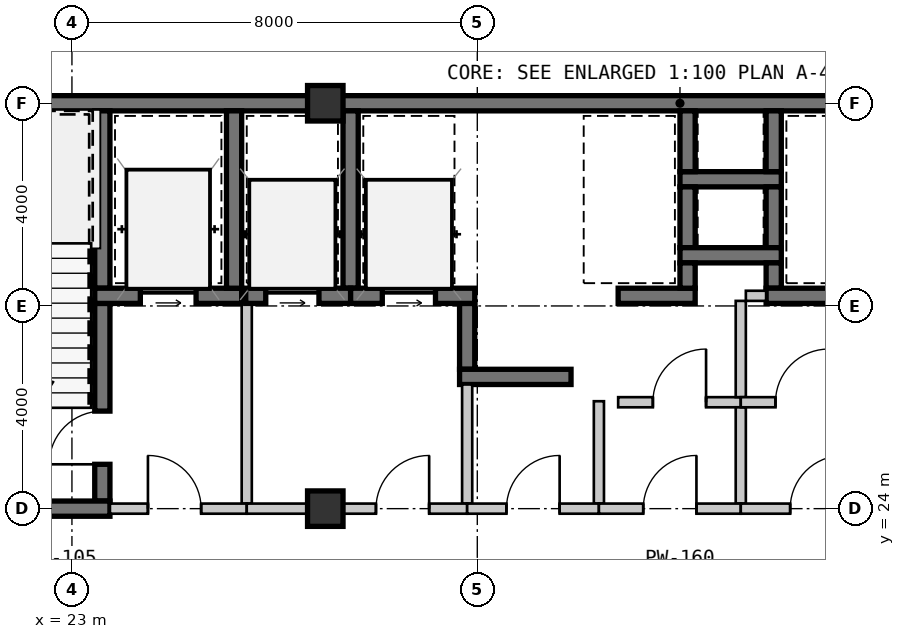
"""IFC4 building model, lengths in metres.
Left out: names, types, materials, properties, quantities, classifications, styles, units other than length and angle.
Written with IfcOpenShell. Run it as: python <this file> out.ifc"""

import sys

from ifc_helpers import new_model, si_unit, direction, frame, frame_2d, origin, origin_2d, place, context, subcontext, project, spatial, rectangle, extrude, source, transform, mapped, element, fill, save


model = new_model("IFC4")
c1 = context("Model", 3, precision=1e-05, world=origin(), true_north=direction((0.0, 1.0)))
c2 = subcontext(c1, "Body", "Model", "MODEL_VIEW")
j1 = project(units=[si_unit("LENGTHUNIT", "METRE"), si_unit("PLANEANGLEUNIT", "RADIAN")], contexts=[c1])
p1 = place(None, origin())
s1 = spatial("IfcSite", under=j1, at=p1, CompositionType="ELEMENT")
p2 = place(p1, origin())
s2 = spatial("IfcBuilding", under=s1, at=p2, CompositionType="ELEMENT")
p3 = place(p2, frame((0.0, 0.0, 99.75)))
s3 = spatial("IfcBuildingStorey", under=s2, at=p3, CompositionType="ELEMENT", Elevation=99.75)
m1 = source(origin(), c2, "Body", "SweptSolid", [
    extrude(rectangle(XDim=0.7, YDim=0.7, at=origin_2d()), origin(), (0.0, 0.0, 1.0), 3.15),
])
for number, where, z_axis, x_axis in (
    (1, (28.0, 24.0, 0.0), (0.0, 0.0, 1.0), (1.0, 0.0, 0.0)),
    (2, (28.0, 32.0, 0.0), (0.0, 0.0, 1.0), (1.0, 0.0, 0.0)),
):
    element("IfcColumn", number, at=place(p3, frame(where, z_axis=z_axis, x_axis=x_axis)), inside=s3, PredefinedType="COLUMN", context=c2, shape_type="MappedRepresentation", body=[
        mapped(m1, transform((0.0, 0.0, 0.0), scale=1.0)),
    ])
m2 = source(origin(), c2, "Body", "SweptSolid", [
    extrude(rectangle(XDim=9.15, YDim=0.3, at=frame_2d((4.575, 0.0))), origin(), (0.0, 0.0, 1.0), 2.93),
])
p4 = place(p3, frame((18.85, 32.0, 0.0), z_axis=(0.0, 0.0, 1.0), x_axis=(1.0, 0.0, 0.0)))
e3 = element("IfcWall", 3, at=p4, inside=s3, PredefinedType="SHEAR", context=c2, shape_type="MappedRepresentation", body=[
    mapped(m2, transform((0.0, 0.0, 0.0), scale=1.0)),
])
m3 = source(origin(), c2, "Body", "SweptSolid", [
    extrude(rectangle(XDim=11.2, YDim=0.3, at=frame_2d((5.6, 0.0))), origin(), (0.0, 0.0, 1.0), 2.93),
])
p5 = place(p3, frame((28.0, 32.0, 0.0), z_axis=(0.0, 0.0, 1.0), x_axis=(1.0, 0.0, 0.0)))
e4 = element("IfcWall", 4, at=p5, inside=s3, PredefinedType="SHEAR", context=c2, shape_type="MappedRepresentation", body=[
    mapped(m3, transform((0.0, 0.0, 0.0), scale=1.0)),
])
m4 = source(origin(), c2, "Body", "SweptSolid", [
    extrude(rectangle(XDim=3.5, YDim=0.3, at=frame_2d((1.75, 0.0))), origin(), (0.0, 0.0, 1.0), 2.93),
])
p6 = place(p3, frame((23.6, 28.35, 0.0), z_axis=(0.0, 0.0, 1.0), x_axis=(0.0, 1.0, 0.0)))
e5 = element("IfcWall", 5, at=p6, inside=s3, PredefinedType="SHEAR", context=c2, shape_type="MappedRepresentation", body=[
    mapped(m4, transform((0.0, 0.0, 0.0), scale=1.0)),
])
m5 = source(origin(), c2, "Body", "SweptSolid", [
    extrude(rectangle(XDim=3.9, YDim=0.3, at=frame_2d((1.95, 0.0))), origin(), (0.0, 0.0, 1.0), 2.93),
])
p7 = place(p3, frame((23.6, 24.15, 0.0), z_axis=(0.0, 0.0, 1.0), x_axis=(0.0, 1.0, 0.0)))
e6 = element("IfcWall", 6, at=p7, inside=s3, PredefinedType="SHEAR", context=c2, shape_type="MappedRepresentation", body=[
    mapped(m5, transform((0.0, 0.0, 0.0), scale=1.0)),
])
m6 = source(origin(), c2, "Body", "SweptSolid", [
    extrude(rectangle(XDim=1.05, YDim=2.1, at=frame_2d((0.525, 1.05))), frame((0.0, 0.16, 0.0), z_axis=(0.0, -1.0, 0.0), x_axis=(1.0, 0.0, 0.0)), (0.0, 0.0, 1.0), 0.32),
])
p8 = place(p7, frame((0.725, 0.0, 0.0)))
e7 = element("IfcOpeningElement", 7, at=p8, cuts=e6, PredefinedType="OPENING", context=c2, shape_type="MappedRepresentation", body=[
    mapped(m6, transform((0.0, 0.0, 0.0), scale=1.0)),
])
m7 = source(origin(), c2, "Body", "SweptSolid", [
    extrude(rectangle(XDim=4.9, YDim=0.3, at=frame_2d((2.45, 0.0))), origin(), (0.0, 0.0, 1.0), 2.93),
])
p9 = place(p3, frame((18.85, 24.0, 0.0), z_axis=(0.0, 0.0, 1.0), x_axis=(1.0, 0.0, 0.0)))
e8 = element("IfcWall", 8, at=p9, inside=s3, PredefinedType="SHEAR", context=c2, shape_type="MappedRepresentation", body=[
    mapped(m7, transform((0.0, 0.0, 0.0), scale=1.0)),
])
m8 = source(origin(), c2, "Body", "SweptSolid", [
    extrude(rectangle(XDim=2.9, YDim=0.3, at=frame_2d((1.45, 0.0))), origin(), (0.0, 0.0, 1.0), 2.93),
])
p10 = place(p3, frame((23.45, 28.2, 0.0), z_axis=(0.0, 0.0, 1.0), x_axis=(1.0, 0.0, 0.0)))
e9 = element("IfcWall", 9, at=p10, inside=s3, PredefinedType="SHEAR", context=c2, shape_type="MappedRepresentation", body=[
    mapped(m8, transform((0.0, 0.0, 0.0), scale=1.0)),
])
m9 = source(origin(), c2, "Body", "SweptSolid", [
    extrude(rectangle(XDim=1.1, YDim=2.15, at=frame_2d((0.55, 1.075))), frame((0.0, 0.16, 0.0), z_axis=(0.0, -1.0, 0.0), x_axis=(1.0, 0.0, 0.0)), (0.0, 0.0, 1.0), 0.32),
])
p11 = place(p10, frame((0.9, 0.0, 0.0)))
e10 = element("IfcOpeningElement", 10, at=p11, cuts=e9, PredefinedType="OPENING", context=c2, shape_type="MappedRepresentation", body=[
    mapped(m9, transform((0.0, 0.0, 0.0), scale=1.0)),
])
p12 = place(p3, frame((26.2, 28.35, 0.0), z_axis=(0.0, 0.0, 1.0), x_axis=(0.0, 1.0, 0.0)))
e11 = element("IfcWall", 11, at=p12, inside=s3, PredefinedType="SHEAR", context=c2, shape_type="MappedRepresentation", body=[
    mapped(m4, transform((0.0, 0.0, 0.0), scale=1.0)),
])
m10 = source(origin(), c2, "Body", "SweptSolid", [
    extrude(rectangle(XDim=3.95, YDim=0.2, at=frame_2d((1.975, 0.0))), origin(), (0.0, 0.0, 1.0), 2.93),
])
p13 = place(p3, frame((26.45, 24.1, 0.0), z_axis=(0.0, 0.0, 1.0), x_axis=(0.0, 1.0, 0.0)))
e12 = element("IfcWall", 12, at=p13, inside=s3, PredefinedType="SOLIDWALL", context=c2, shape_type="MappedRepresentation", body=[
    mapped(m10, transform((0.0, 0.0, 0.0), scale=1.0)),
])
m11 = source(origin(), c2, "Body", "SweptSolid", [
    extrude(rectangle(XDim=2.7, YDim=0.2, at=frame_2d((1.35, 0.0))), origin(), (0.0, 0.0, 1.0), 2.47),
])
p14 = place(p3, frame((23.75, 24.0, 0.0), z_axis=(0.0, 0.0, 1.0), x_axis=(1.0, 0.0, 0.0)))
e13 = element("IfcWall", 13, at=p14, inside=s3, PredefinedType="SOLIDWALL", context=c2, shape_type="MappedRepresentation", body=[
    mapped(m11, transform((0.0, 0.0, 0.0), scale=1.0)),
])
m12 = source(origin(), c2, "Body", "SweptSolid", [
    extrude(rectangle(XDim=1.05, YDim=2.1, at=frame_2d((0.525, 1.05))), frame((0.0, 0.11, 0.0), z_axis=(0.0, -1.0, 0.0), x_axis=(1.0, 0.0, 0.0)), (0.0, 0.0, 1.0), 0.22),
])
p15 = place(p14, frame((0.75, 0.0, 0.0)))
e14 = element("IfcOpeningElement", 14, at=p15, cuts=e13, PredefinedType="OPENING", context=c2, shape_type="MappedRepresentation", body=[
    mapped(m12, transform((0.0, 0.0, 0.0), scale=1.0)),
])
m13 = source(origin(), c2, "Body", "SweptSolid", [
    extrude(rectangle(XDim=2.0, YDim=0.3, at=frame_2d((1.0, 0.0))), origin(), (0.0, 0.0, 1.0), 2.93),
])
p16 = place(p3, frame((35.0, 30.5, 0.0), z_axis=(0.0, 0.0, 1.0), x_axis=(1.0, 0.0, 0.0)))
e15 = element("IfcWall", 15, at=p16, inside=s3, PredefinedType="SHEAR", context=c2, shape_type="MappedRepresentation", body=[
    mapped(m13, transform((0.0, 0.0, 0.0), scale=1.0)),
])
m14 = source(origin(), c2, "Body", "SweptSolid", [
    extrude(rectangle(XDim=1.2, YDim=0.3, at=frame_2d((0.6, 0.0))), origin(), (0.0, 0.0, 1.0), 2.93),
])
for number, where, z_axis, x_axis in (
    (16, (35.15, 31.85, 0.0), (0.0, 0.0, 1.0), (0.0, -1.0, 0.0)),
    (17, (36.85, 30.65, 0.0), (0.0, 0.0, 1.0), (0.0, 1.0, 0.0)),
    (18, (35.15, 30.35, 0.0), (0.0, 0.0, 1.0), (0.0, -1.0, 0.0)),
    (19, (36.85, 29.15, 0.0), (0.0, 0.0, 1.0), (0.0, 1.0, 0.0)),
):
    element("IfcWall", number, at=place(p3, frame(where, z_axis=z_axis, x_axis=x_axis)), inside=s3, PredefinedType="SHEAR", context=c2, shape_type="MappedRepresentation", body=[
        mapped(m14, transform((0.0, 0.0, 0.0), scale=1.0)),
    ])
p17 = place(p3, frame((35.0, 29.0, 0.0), z_axis=(0.0, 0.0, 1.0), x_axis=(1.0, 0.0, 0.0)))
e20 = element("IfcWall", 20, at=p17, inside=s3, PredefinedType="SHEAR", context=c2, shape_type="MappedRepresentation", body=[
    mapped(m13, transform((0.0, 0.0, 0.0), scale=1.0)),
])
m15 = source(origin(), c2, "Body", "SweptSolid", [
    extrude(rectangle(XDim=1.3, YDim=0.3, at=frame_2d((0.65, 0.0))), origin(), (0.0, 0.0, 1.0), 2.93),
])
p18 = place(p3, frame((30.8, 28.05, 0.0), z_axis=(0.0, 0.0, 1.0), x_axis=(0.0, -1.0, 0.0)))
e21 = element("IfcWall", 21, at=p18, inside=s3, PredefinedType="SHEAR", context=c2, shape_type="MappedRepresentation", body=[
    mapped(m15, transform((0.0, 0.0, 0.0), scale=1.0)),
])
m16 = source(origin(), c2, "Body", "SweptSolid", [
    extrude(rectangle(XDim=2.2, YDim=0.3, at=frame_2d((1.1, 0.0))), origin(), (0.0, 0.0, 1.0), 2.93),
])
p19 = place(p3, frame((30.65, 26.6, 0.0), z_axis=(0.0, 0.0, 1.0), x_axis=(1.0, 0.0, 0.0)))
e22 = element("IfcWall", 22, at=p19, inside=s3, PredefinedType="SHEAR", context=c2, shape_type="MappedRepresentation", body=[
    mapped(m16, transform((0.0, 0.0, 0.0), scale=1.0)),
])
p20 = place(p3, frame((28.5, 28.35, 0.0), z_axis=(0.0, 0.0, 1.0), x_axis=(0.0, 1.0, 0.0)))
e23 = element("IfcWall", 23, at=p20, inside=s3, PredefinedType="SHEAR", context=c2, shape_type="MappedRepresentation", body=[
    mapped(m4, transform((0.0, 0.0, 0.0), scale=1.0)),
])
m17 = source(origin(), c2, "Body", "SweptSolid", [
    extrude(rectangle(XDim=2.07, YDim=0.3, at=frame_2d((1.035, 0.0))), origin(), (0.0, 0.0, 1.0), 2.93),
])
p21 = place(p3, frame((26.43, 28.2, 0.0), z_axis=(0.0, 0.0, 1.0), x_axis=(1.0, 0.0, 0.0)))
e24 = element("IfcWall", 24, at=p21, inside=s3, PredefinedType="SHEAR", context=c2, shape_type="MappedRepresentation", body=[
    mapped(m17, transform((0.0, 0.0, 0.0), scale=1.0)),
])
m18 = source(origin(), c2, "Body", "SweptSolid", [
    extrude(rectangle(XDim=1.05, YDim=2.15, at=frame_2d((0.525, 1.075))), frame((0.0, 0.16, 0.0), z_axis=(0.0, -1.0, 0.0), x_axis=(1.0, 0.0, 0.0)), (0.0, 0.0, 1.0), 0.32),
])
p22 = place(p21, frame((0.395, 0.0, 0.0)))
e25 = element("IfcOpeningElement", 25, at=p22, cuts=e24, PredefinedType="OPENING", context=c2, shape_type="MappedRepresentation", body=[
    mapped(m18, transform((0.0, 0.0, 0.0), scale=1.0)),
])
m19 = source(origin(), c2, "Body", "SweptSolid", [
    extrude(rectangle(XDim=2.45, YDim=0.3, at=frame_2d((1.225, 0.0))), origin(), (0.0, 0.0, 1.0), 2.93),
])
p23 = place(p3, frame((28.5, 28.2, 0.0), z_axis=(0.0, 0.0, 1.0), x_axis=(1.0, 0.0, 0.0)))
e26 = element("IfcWall", 26, at=p23, inside=s3, PredefinedType="SHEAR", context=c2, shape_type="MappedRepresentation", body=[
    mapped(m19, transform((0.0, 0.0, 0.0), scale=1.0)),
])
p24 = place(p23, frame((0.625, 0.0, 0.0)))
e27 = element("IfcOpeningElement", 27, at=p24, cuts=e26, PredefinedType="OPENING", context=c2, shape_type="MappedRepresentation", body=[
    mapped(m18, transform((0.0, 0.0, 0.0), scale=1.0)),
])
m20 = source(origin(), c2, "Body", "SweptSolid", [
    extrude(rectangle(XDim=2.35, YDim=0.2, at=frame_2d((1.175, 0.0))), origin(), (0.0, 0.0, 1.0), 2.93),
])
p25 = place(p3, frame((30.8, 26.45, 0.0), z_axis=(0.0, 0.0, 1.0), x_axis=(0.0, -1.0, 0.0)))
e28 = element("IfcWall", 28, at=p25, inside=s3, PredefinedType="SOLIDWALL", context=c2, shape_type="MappedRepresentation", body=[
    mapped(m20, transform((0.0, 0.0, 0.0), scale=1.0)),
])
m21 = source(origin(), c2, "Body", "SweptSolid", [
    extrude(rectangle(XDim=4.35, YDim=0.2, at=frame_2d((2.175, 0.0))), origin(), (0.0, 0.0, 1.0), 2.47),
])
p26 = place(p3, frame((30.8, 24.0, 0.0), z_axis=(0.0, 0.0, 1.0), x_axis=(-1.0, 0.0, 0.0)))
e29 = element("IfcWall", 29, at=p26, inside=s3, PredefinedType="SOLIDWALL", context=c2, shape_type="MappedRepresentation", body=[
    mapped(m21, transform((0.0, 0.0, 0.0), scale=1.0)),
])
p27 = place(p26, frame((0.75, 0.0, 0.0)))
e30 = element("IfcOpeningElement", 30, at=p27, cuts=e29, PredefinedType="OPENING", context=c2, shape_type="MappedRepresentation", body=[
    mapped(m12, transform((0.0, 0.0, 0.0), scale=1.0)),
])
m22 = source(origin(), c2, "Body", "SweptSolid", [
    extrude(rectangle(XDim=1.52, YDim=0.3, at=frame_2d((0.76, 0.0))), origin(), (0.0, 0.0, 1.0), 2.93),
])
p28 = place(p3, frame((33.78, 28.2, 0.0), z_axis=(0.0, 0.0, 1.0), x_axis=(1.0, 0.0, 0.0)))
e31 = element("IfcWall", 31, at=p28, inside=s3, PredefinedType="SHEAR", context=c2, shape_type="MappedRepresentation", body=[
    mapped(m22, transform((0.0, 0.0, 0.0), scale=1.0)),
])
m23 = source(origin(), c2, "Body", "SweptSolid", [
    extrude(rectangle(XDim=0.5, YDim=0.3, at=frame_2d((0.25, 0.0))), origin(), (0.0, 0.0, 1.0), 2.93),
])
for number, where, z_axis, x_axis in (
    (32, (35.15, 28.35, 0.0), (0.0, 0.0, 1.0), (0.0, 1.0, 0.0)),
    (33, (36.85, 28.85, 0.0), (0.0, 0.0, 1.0), (0.0, -1.0, 0.0)),
):
    element("IfcWall", number, at=place(p3, frame(where, z_axis=z_axis, x_axis=x_axis)), inside=s3, PredefinedType="SHEAR", context=c2, shape_type="MappedRepresentation", body=[
        mapped(m23, transform((0.0, 0.0, 0.0), scale=1.0)),
    ])
m24 = source(origin(), c2, "Body", "SweptSolid", [
    extrude(rectangle(XDim=1.92, YDim=0.3, at=frame_2d((0.96, 0.0))), origin(), (0.0, 0.0, 1.0), 2.93),
])
p29 = place(p3, frame((36.7, 28.2, 0.0), z_axis=(0.0, 0.0, 1.0), x_axis=(1.0, 0.0, 0.0)))
e34 = element("IfcWall", 34, at=p29, inside=s3, PredefinedType="SHEAR", context=c2, shape_type="MappedRepresentation", body=[
    mapped(m24, transform((0.0, 0.0, 0.0), scale=1.0)),
])
m25 = source(origin(), c2, "Body", "SweptSolid", [
    extrude(rectangle(XDim=2.02, YDim=0.2, at=frame_2d((1.01, 0.0))), origin(), (0.0, 0.0, 1.0), 2.93),
])
p30 = place(p3, frame((33.4, 26.12, 0.0), z_axis=(0.0, 0.0, 1.0), x_axis=(0.0, -1.0, 0.0)))
e35 = element("IfcWall", 35, at=p30, inside=s3, PredefinedType="SOLIDWALL", context=c2, shape_type="MappedRepresentation", body=[
    mapped(m25, transform((0.0, 0.0, 0.0), scale=1.0)),
])
m26 = source(origin(), c2, "Body", "SweptSolid", [
    extrude(rectangle(XDim=2.6, YDim=0.2, at=frame_2d((1.3, 0.0))), origin(), (0.0, 0.0, 1.0), 2.47),
])
p31 = place(p3, frame((33.4, 24.0, 0.0), z_axis=(0.0, 0.0, 1.0), x_axis=(-1.0, 0.0, 0.0)))
e36 = element("IfcWall", 36, at=p31, inside=s3, PredefinedType="SOLIDWALL", context=c2, shape_type="MappedRepresentation", body=[
    mapped(m26, transform((0.0, 0.0, 0.0), scale=1.0)),
])
p32 = place(p31, frame((0.775, 0.0, 0.0)))
e37 = element("IfcOpeningElement", 37, at=p32, cuts=e36, PredefinedType="OPENING", context=c2, shape_type="MappedRepresentation", body=[
    mapped(m12, transform((0.0, 0.0, 0.0), scale=1.0)),
])
m27 = source(origin(), c2, "Body", "SweptSolid", [
    extrude(rectangle(XDim=2.42, YDim=0.2, at=frame_2d((1.21, 0.0))), origin(), (0.0, 0.0, 1.0), 2.93),
])
p33 = place(p3, frame((33.78, 26.1, 0.0), z_axis=(0.0, 0.0, 1.0), x_axis=(1.0, 0.0, 0.0)))
e38 = element("IfcWall", 38, at=p33, inside=s3, PredefinedType="SOLIDWALL", context=c2, shape_type="MappedRepresentation", body=[
    mapped(m27, transform((0.0, 0.0, 0.0), scale=1.0)),
])
p34 = place(p33, frame((0.685, 0.0, 0.0)))
e39 = element("IfcOpeningElement", 39, at=p34, cuts=e38, PredefinedType="OPENING", context=c2, shape_type="MappedRepresentation", body=[
    mapped(m12, transform((0.0, 0.0, 0.0), scale=1.0)),
])
m28 = source(origin(), c2, "Body", "SweptSolid", [
    extrude(rectangle(XDim=1.9, YDim=0.2, at=frame_2d((0.95, 0.0))), origin(), (0.0, 0.0, 1.0), 2.93),
])
p35 = place(p3, frame((36.2, 26.0, 0.0), z_axis=(0.0, 0.0, 1.0), x_axis=(0.0, -1.0, 0.0)))
e40 = element("IfcWall", 40, at=p35, inside=s3, PredefinedType="SOLIDWALL", context=c2, shape_type="MappedRepresentation", body=[
    mapped(m28, transform((0.0, 0.0, 0.0), scale=1.0)),
])
m29 = source(origin(), c2, "Body", "SweptSolid", [
    extrude(rectangle(XDim=2.8, YDim=0.2, at=frame_2d((1.4, 0.0))), origin(), (0.0, 0.0, 1.0), 2.47),
])
p36 = place(p3, frame((36.2, 24.0, 0.0), z_axis=(0.0, 0.0, 1.0), x_axis=(-1.0, 0.0, 0.0)))
e41 = element("IfcWall", 41, at=p36, inside=s3, PredefinedType="SOLIDWALL", context=c2, shape_type="MappedRepresentation", body=[
    mapped(m29, transform((0.0, 0.0, 0.0), scale=1.0)),
])
p37 = place(p36, frame((0.875, 0.0, 0.0)))
e42 = element("IfcOpeningElement", 42, at=p37, cuts=e41, PredefinedType="OPENING", context=c2, shape_type="MappedRepresentation", body=[
    mapped(m12, transform((0.0, 0.0, 0.0), scale=1.0)),
])
m30 = source(origin(), c2, "Body", "SweptSolid", [
    extrude(rectangle(XDim=1.9, YDim=0.2, at=frame_2d((0.95, 0.0))), origin(), (0.0, 0.0, 1.0), 2.93),
])
p38 = place(p3, frame((36.2, 28.1, 0.0), z_axis=(0.0, 0.0, 1.0), x_axis=(0.0, -1.0, 0.0)))
e43 = element("IfcWall", 43, at=p38, inside=s3, PredefinedType="SOLIDWALL", context=c2, shape_type="MappedRepresentation", body=[
    mapped(m30, transform((0.0, 0.0, 0.0), scale=1.0)),
])
m31 = source(origin(), c2, "Body", "SweptSolid", [
    extrude(rectangle(XDim=0.4, YDim=0.2, at=frame_2d((0.2, 0.0))), origin(), (0.0, 0.0, 1.0), 2.93),
])
p39 = place(p3, frame((36.7, 28.2, 0.0), z_axis=(0.0, 0.0, 1.0), x_axis=(-1.0, 0.0, 0.0)))
e44 = element("IfcWall", 44, at=p39, inside=s3, PredefinedType="SOLIDWALL", context=c2, shape_type="MappedRepresentation", body=[
    mapped(m31, transform((0.0, 0.0, 0.0), scale=1.0)),
])
m32 = source(origin(), c2, "Body", "SweptSolid", [
    extrude(rectangle(XDim=2.42, YDim=0.2, at=frame_2d((1.21, 0.0))), origin(), (0.0, 0.0, 1.0), 2.93),
])
p40 = place(p3, frame((36.2, 26.1, 0.0), z_axis=(0.0, 0.0, 1.0), x_axis=(1.0, 0.0, 0.0)))
e45 = element("IfcWall", 45, at=p40, inside=s3, PredefinedType="SOLIDWALL", context=c2, shape_type="MappedRepresentation", body=[
    mapped(m32, transform((0.0, 0.0, 0.0), scale=1.0)),
])
p41 = place(p40, frame((0.685, 0.0, 0.0)))
e46 = element("IfcOpeningElement", 46, at=p41, cuts=e45, PredefinedType="OPENING", context=c2, shape_type="MappedRepresentation", body=[
    mapped(m12, transform((0.0, 0.0, 0.0), scale=1.0)),
])
m33 = source(origin(), c2, "Body", "SweptSolid", [
    extrude(rectangle(XDim=3.0, YDim=0.2, at=frame_2d((1.5, 0.0))), origin(), (0.0, 0.0, 1.0), 2.47),
])
p42 = place(p3, frame((39.2, 24.0, 0.0), z_axis=(0.0, 0.0, 1.0), x_axis=(-1.0, 0.0, 0.0)))
e47 = element("IfcWall", 47, at=p42, inside=s3, PredefinedType="SOLIDWALL", context=c2, shape_type="MappedRepresentation", body=[
    mapped(m33, transform((0.0, 0.0, 0.0), scale=1.0)),
])
p43 = place(p42, frame((0.975, 0.0, 0.0)))
e48 = element("IfcOpeningElement", 48, at=p43, cuts=e47, PredefinedType="OPENING", context=c2, shape_type="MappedRepresentation", body=[
    mapped(m12, transform((0.0, 0.0, 0.0), scale=1.0)),
])
m34 = source(origin(), c2, "Body", "SweptSolid", [
    extrude(rectangle(XDim=1.05, YDim=2.1, at=frame_2d((0.525, 1.05))), frame((0.0, 0.025, 0.0), z_axis=(0.0, -1.0, 0.0), x_axis=(1.0, 0.0, 0.0)), (0.0, 0.0, 1.0), 0.05),
])
p44 = place(p8, origin())
e49 = element("IfcDoor", 49, at=p44, inside=s3, OperationType="SINGLE_SWING_LEFT", PredefinedType="DOOR", context=c2, shape_type="MappedRepresentation", body=[
    mapped(m34, transform((0.0, 0.0, 0.0), scale=1.0)),
])
fill(e7, e49)
m35 = source(origin(), c2, "Body", "SweptSolid", [
    extrude(rectangle(XDim=1.1, YDim=2.15, at=frame_2d((0.55, 1.075))), frame((0.0, 0.025, 0.0), z_axis=(0.0, -1.0, 0.0), x_axis=(1.0, 0.0, 0.0)), (0.0, 0.0, 1.0), 0.05),
])
p45 = place(p11, origin())
e50 = element("IfcDoor", 50, at=p45, inside=s3, OperationType="SLIDING_TO_LEFT", PredefinedType="DOOR", context=c2, shape_type="MappedRepresentation", body=[
    mapped(m35, transform((0.0, 0.0, 0.0), scale=1.0)),
])
fill(e10, e50)
p46 = place(p15, origin())
e51 = element("IfcDoor", 51, at=p46, inside=s3, OperationType="SINGLE_SWING_LEFT", PredefinedType="DOOR", context=c2, shape_type="MappedRepresentation", body=[
    mapped(m34, transform((0.0, 0.0, 0.0), scale=1.0)),
])
fill(e14, e51)
m36 = source(origin(), c2, "Body", "SweptSolid", [
    extrude(rectangle(XDim=1.05, YDim=2.15, at=frame_2d((0.525, 1.075))), frame((0.0, 0.025, 0.0), z_axis=(0.0, -1.0, 0.0), x_axis=(1.0, 0.0, 0.0)), (0.0, 0.0, 1.0), 0.05),
])
p47 = place(p22, origin())
e52 = element("IfcDoor", 52, at=p47, inside=s3, OperationType="SLIDING_TO_LEFT", PredefinedType="DOOR", context=c2, shape_type="MappedRepresentation", body=[
    mapped(m36, transform((0.0, 0.0, 0.0), scale=1.0)),
])
fill(e25, e52)
p48 = place(p24, origin())
e53 = element("IfcDoor", 53, at=p48, inside=s3, OperationType="SLIDING_TO_LEFT", PredefinedType="DOOR", context=c2, shape_type="MappedRepresentation", body=[
    mapped(m36, transform((0.0, 0.0, 0.0), scale=1.0)),
])
fill(e27, e53)
p49 = place(p27, frame((1.05, 0.0, 0.0), z_axis=(0.0, 0.0, 1.0), x_axis=(-1.0, 0.0, 0.0)))
e54 = element("IfcDoor", 54, at=p49, inside=s3, OperationType="SINGLE_SWING_RIGHT", PredefinedType="DOOR", context=c2, shape_type="MappedRepresentation", body=[
    mapped(m34, transform((0.0, 0.0, 0.0), scale=1.0)),
])
fill(e30, e54)
p50 = place(p32, frame((1.05, 0.0, 0.0), z_axis=(0.0, 0.0, 1.0), x_axis=(-1.0, 0.0, 0.0)))
e55 = element("IfcDoor", 55, at=p50, inside=s3, OperationType="SINGLE_SWING_RIGHT", PredefinedType="DOOR", context=c2, shape_type="MappedRepresentation", body=[
    mapped(m34, transform((0.0, 0.0, 0.0), scale=1.0)),
])
fill(e37, e55)
p51 = place(p34, origin())
e56 = element("IfcDoor", 56, at=p51, inside=s3, OperationType="SINGLE_SWING_RIGHT", PredefinedType="DOOR", context=c2, shape_type="MappedRepresentation", body=[
    mapped(m34, transform((0.0, 0.0, 0.0), scale=1.0)),
])
fill(e39, e56)
p52 = place(p37, frame((1.05, 0.0, 0.0), z_axis=(0.0, 0.0, 1.0), x_axis=(-1.0, 0.0, 0.0)))
e57 = element("IfcDoor", 57, at=p52, inside=s3, OperationType="SINGLE_SWING_RIGHT", PredefinedType="DOOR", context=c2, shape_type="MappedRepresentation", body=[
    mapped(m34, transform((0.0, 0.0, 0.0), scale=1.0)),
])
fill(e42, e57)
p53 = place(p41, origin())
e58 = element("IfcDoor", 58, at=p53, inside=s3, OperationType="SINGLE_SWING_RIGHT", PredefinedType="DOOR", context=c2, shape_type="MappedRepresentation", body=[
    mapped(m34, transform((0.0, 0.0, 0.0), scale=1.0)),
])
fill(e46, e58)
p54 = place(p43, frame((1.05, 0.0, 0.0), z_axis=(0.0, 0.0, 1.0), x_axis=(-1.0, 0.0, 0.0)))
e59 = element("IfcDoor", 59, at=p54, inside=s3, OperationType="SINGLE_SWING_RIGHT", PredefinedType="DOOR", context=c2, shape_type="MappedRepresentation", body=[
    mapped(m34, transform((0.0, 0.0, 0.0), scale=1.0)),
])
fill(e48, e59)
save(model, sys.argv[1])
